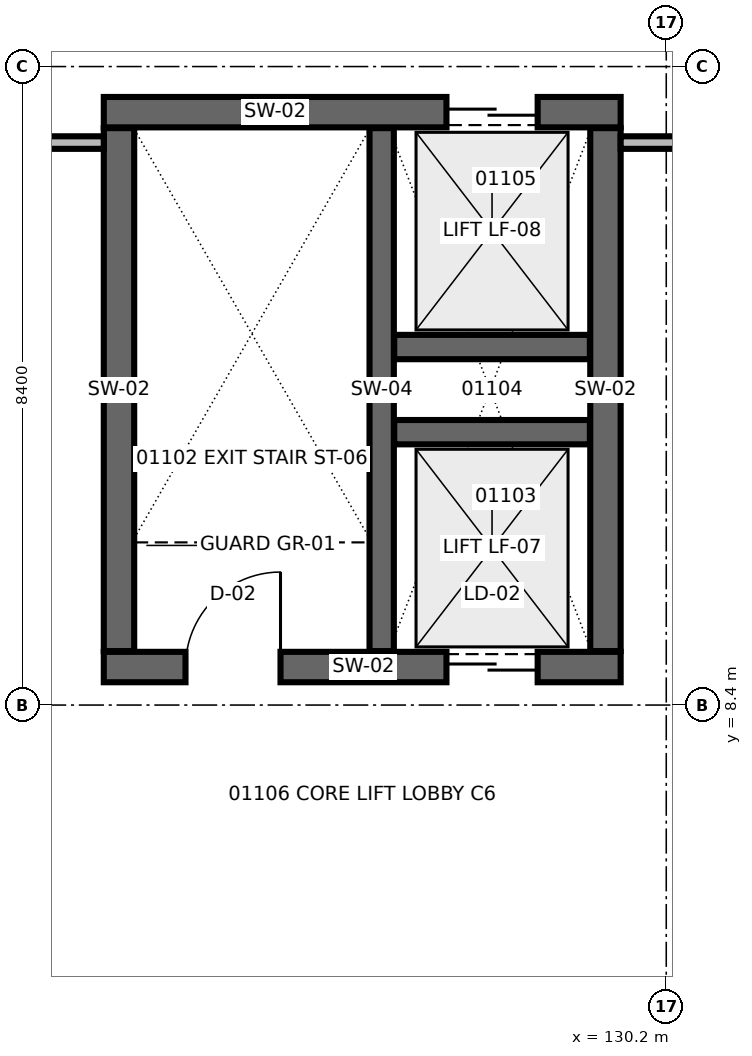
"""IFC4 building model, lengths in metres.
Left out: names, types, materials, properties, quantities, classifications, styles, units other than length and angle.
Written with IfcOpenShell. Run it as: python <this file> out.ifc"""

import sys

from ifc_helpers import new_model, si_unit, direction, frame, frame_2d, origin, place, context, subcontext, project, spatial, rectangle, extrude, element, fill, save


model = new_model("IFC4")
c1 = context("Model", 3, precision=1e-05, world=origin(), true_north=direction((0.0, 1.0)))
c2 = subcontext(c1, "Body", "Model", "MODEL_VIEW")
j1 = project(units=[si_unit("LENGTHUNIT", "METRE"), si_unit("PLANEANGLEUNIT", "RADIAN")], contexts=[c1])
p1 = place(None, origin())
s1 = spatial("IfcSite", under=j1, at=p1, CompositionType="ELEMENT")
p2 = place(p1, origin())
s2 = spatial("IfcBuilding", under=s1, at=p2, CompositionType="ELEMENT")
p3 = place(p2, frame((0.0, 0.0, 5.1)))
s3 = spatial("IfcBuildingStorey", under=s2, at=p3, CompositionType="ELEMENT", Elevation=5.1)
p4 = place(p3, frame((122.8, 8.9, 0.0), z_axis=(0.0, 0.0, 1.0), x_axis=(1.0, 0.0, 0.0)))
e1 = element("IfcWall", 1, at=p4, inside=s3, PredefinedType="SHEAR", context=c2, shape_type="SweptSolid", body=[
    extrude(rectangle(XDim=6.8, YDim=0.4, at=frame_2d((3.4, 0.0))), origin(), (0.0, 0.0, 1.0), 4.22),
])
p5 = place(p4, frame((1.075, 0.0, 0.0)))
e2 = element("IfcOpeningElement", 2, at=p5, cuts=e1, PredefinedType="OPENING", context=c2, shape_type="SweptSolid", body=[
    extrude(rectangle(XDim=1.25, YDim=2.2, at=frame_2d((0.625, 1.1))), frame((0.0, 0.21, 0.0), z_axis=(0.0, -1.0, 0.0), x_axis=(1.0, 0.0, 0.0)), (0.0, 0.0, 1.0), 0.42),
])
p6 = place(p4, frame((4.508, 0.0, 0.0)))
e3 = element("IfcOpeningElement", 3, at=p6, cuts=e1, PredefinedType="OPENING", context=c2, shape_type="SweptSolid", body=[
    extrude(rectangle(XDim=1.2, YDim=2.25, at=frame_2d((0.6, 1.125))), frame((0.0, 0.21, 0.0), z_axis=(0.0, -1.0, 0.0), x_axis=(1.0, 0.0, 0.0)), (0.0, 0.0, 1.0), 0.42),
])
p7 = place(p3, frame((122.8, 16.2, 0.0), z_axis=(0.0, 0.0, 1.0), x_axis=(1.0, 0.0, 0.0)))
e4 = element("IfcWall", 4, at=p7, inside=s3, PredefinedType="SHEAR", context=c2, shape_type="SweptSolid", body=[
    extrude(rectangle(XDim=6.8, YDim=0.4, at=frame_2d((3.4, 0.0))), origin(), (0.0, 0.0, 1.0), 4.22),
])
p8 = place(p7, frame((4.508, 0.0, 0.0)))
e5 = element("IfcOpeningElement", 5, at=p8, cuts=e4, PredefinedType="OPENING", context=c2, shape_type="SweptSolid", body=[
    extrude(rectangle(XDim=1.2, YDim=2.25, at=frame_2d((0.6, 1.125))), frame((0.0, 0.21, 0.0), z_axis=(0.0, -1.0, 0.0), x_axis=(1.0, 0.0, 0.0)), (0.0, 0.0, 1.0), 0.42),
])
for number, where, z_axis, x_axis in (
    (6, (123.0, 9.11, 0.0), (0.0, 0.0, 1.0), (0.0, 1.0, 0.0)),
    (7, (129.4, 9.11, 0.0), (0.0, 0.0, 1.0), (0.0, 1.0, 0.0)),
):
    element("IfcWall", number, at=place(p3, frame(where, z_axis=z_axis, x_axis=x_axis)), inside=s3, PredefinedType="SHEAR", context=c2, shape_type="SweptSolid", body=[
        extrude(rectangle(XDim=6.88, YDim=0.4, at=frame_2d((3.44, 0.0))), origin(), (0.0, 0.0, 1.0), 4.22),
    ])
p9 = place(p3, frame((126.456, 9.11, 0.0), z_axis=(0.0, 0.0, 1.0), x_axis=(0.0, 1.0, 0.0)))
e8 = element("IfcWall", 8, at=p9, inside=s3, PredefinedType="SHEAR", context=c2, shape_type="SweptSolid", body=[
    extrude(rectangle(XDim=6.88, YDim=0.32, at=frame_2d((3.44, 0.0))), origin(), (0.0, 0.0, 1.0), 4.22),
])
for number, where, z_axis, x_axis in (
    (9, (126.621, 11.99, 0.0), (0.0, 0.0, 1.0), (1.0, 0.0, 0.0)),
    (10, (126.621, 13.11, 0.0), (0.0, 0.0, 1.0), (1.0, 0.0, 0.0)),
):
    element("IfcWall", number, at=place(p3, frame(where, z_axis=z_axis, x_axis=x_axis)), inside=s3, PredefinedType="SHEAR", context=c2, shape_type="SweptSolid", body=[
        extrude(rectangle(XDim=2.574, YDim=0.32, at=frame_2d((1.287, 0.0))), origin(), (0.0, 0.0, 1.0), 4.22),
    ])
p10 = place(p3, frame((116.8, 15.8, 0.0), z_axis=(0.0, 0.0, 1.0), x_axis=(1.0, 0.0, 0.0)))
e11 = element("IfcWall", 11, at=p10, inside=s3, PredefinedType="PARTITIONING", context=c2, shape_type="SweptSolid", body=[
    extrude(rectangle(XDim=6.0, YDim=0.165, at=frame_2d((3.0, 0.0))), origin(), (0.0, 0.0, 1.0), 3.623),
])
p11 = place(p3, frame((129.6, 15.8, 0.0), z_axis=(0.0, 0.0, 1.0), x_axis=(1.0, 0.0, 0.0)))
e12 = element("IfcWall", 12, at=p11, inside=s3, PredefinedType="PARTITIONING", context=c2, shape_type="SweptSolid", body=[
    extrude(rectangle(XDim=8.96, YDim=0.165, at=frame_2d((4.48, 0.0))), origin(), (0.0, 0.0, 1.0), 4.2),
])
p12 = place(p11, frame((3.755, 0.0, 0.0)))
e13 = element("IfcOpeningElement", 13, at=p12, cuts=e12, PredefinedType="OPENING", context=c2, shape_type="SweptSolid", body=[
    extrude(rectangle(XDim=1.45, YDim=2.25, at=frame_2d((0.725, 1.125))), frame((0.0, 0.093, 0.0), z_axis=(0.0, -1.0, 0.0), x_axis=(1.0, 0.0, 0.0)), (0.0, 0.0, 1.0), 0.185),
])
p13 = place(p5, frame((1.25, 0.0, 0.0), z_axis=(0.0, 0.0, 1.0), x_axis=(-1.0, 0.0, 0.0)))
e14 = element("IfcDoor", 14, at=p13, inside=s3, OperationType="SINGLE_SWING_LEFT", PredefinedType="DOOR", context=c2, shape_type="SweptSolid", body=[
    extrude(rectangle(XDim=1.25, YDim=2.2, at=frame_2d((0.625, 1.1))), frame((0.0, 0.025, 0.0), z_axis=(0.0, -1.0, 0.0), x_axis=(1.0, 0.0, 0.0)), (0.0, 0.0, 1.0), 0.05),
])
fill(e2, e14)
p14 = place(p6, frame((1.2, 0.0, 0.0), z_axis=(0.0, 0.0, 1.0), x_axis=(-1.0, 0.0, 0.0)))
e15 = element("IfcDoor", 15, at=p14, inside=s3, OperationType="DOUBLE_DOOR_SLIDING", PredefinedType="DOOR", context=c2, shape_type="SweptSolid", body=[
    extrude(rectangle(XDim=1.2, YDim=2.25, at=frame_2d((0.6, 1.125))), frame((0.0, 0.025, 0.0), z_axis=(0.0, -1.0, 0.0), x_axis=(1.0, 0.0, 0.0)), (0.0, 0.0, 1.0), 0.05),
])
fill(e3, e15)
p15 = place(p8, origin())
e16 = element("IfcDoor", 16, at=p15, inside=s3, OperationType="DOUBLE_DOOR_SLIDING", PredefinedType="DOOR", context=c2, shape_type="SweptSolid", body=[
    extrude(rectangle(XDim=1.2, YDim=2.25, at=frame_2d((0.6, 1.125))), frame((0.0, 0.025, 0.0), z_axis=(0.0, -1.0, 0.0), x_axis=(1.0, 0.0, 0.0)), (0.0, 0.0, 1.0), 0.05),
])
fill(e5, e16)
save(model, sys.argv[1])
